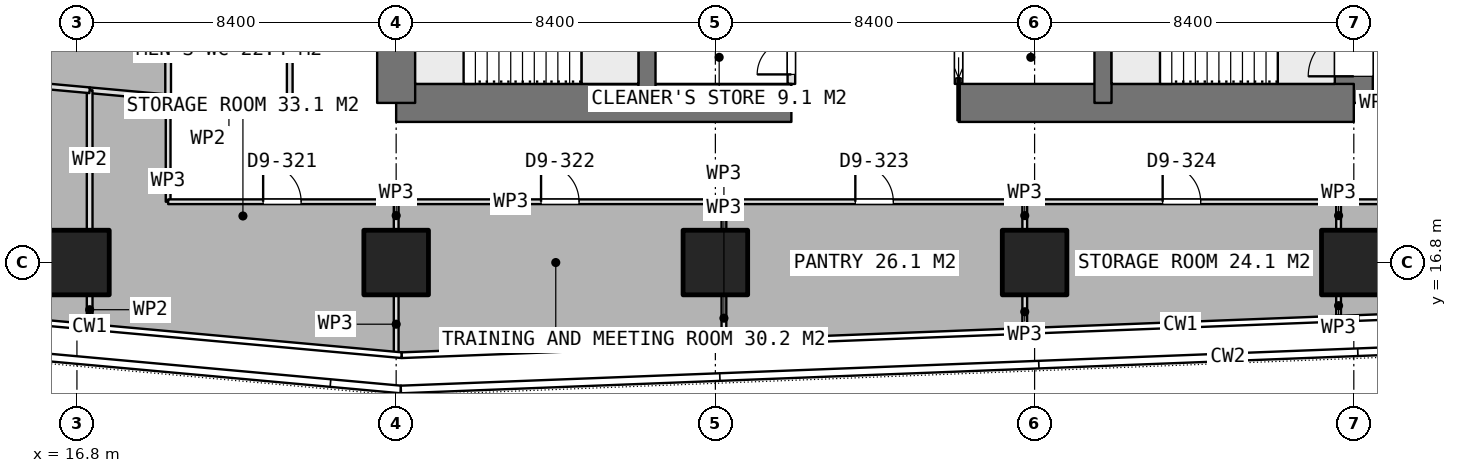
"""IFC4 building model, lengths in metres.
Left out: names, types, materials, properties, quantities, classifications, styles, units other than length and angle.
Written with IfcOpenShell. Run it as: python <this file> out.ifc"""

import sys

from ifc_helpers import new_model, si_unit, direction, frame, frame_2d, origin, origin_2d, place, context, subcontext, project, spatial, rectangle, extrude, element, fill, save


model = new_model("IFC4")
c1 = context("Model", 3, precision=1e-05, world=origin(), true_north=direction((0.0, 1.0)))
c2 = subcontext(c1, "Body", "Model", "MODEL_VIEW")
j1 = project(units=[si_unit("LENGTHUNIT", "METRE"), si_unit("PLANEANGLEUNIT", "RADIAN")], contexts=[c1])
p1 = place(None, origin())
s1 = spatial("IfcSite", under=j1, at=p1, CompositionType="ELEMENT")
p2 = place(p1, origin())
s2 = spatial("IfcBuilding", under=s1, at=p2, CompositionType="ELEMENT")
p3 = place(p2, frame((0.0, 0.0, 99.05)))
s3 = spatial("IfcBuildingStorey", under=s2, at=p3, CompositionType="ELEMENT", Elevation=99.05)
p4 = place(p3, frame((25.2, 21.0, 0.0), z_axis=(0.0, 0.0, 1.0), x_axis=(1.0, 0.0, 0.0)))
e1 = element("IfcWall", 1, at=p4, inside=s3, PredefinedType="SHEAR", context=c2, shape_type="SweptSolid", body=[
    extrude(rectangle(XDim=10.4, YDim=1.0, at=frame_2d((5.2, 0.0))), origin(), (0.0, 0.0, 1.0), 3.75),
])
p5 = place(p3, frame((40.0, 21.0, 0.0), z_axis=(0.0, 0.0, 1.0), x_axis=(1.0, 0.0, 0.0)))
e2 = element("IfcWall", 2, at=p5, inside=s3, PredefinedType="SHEAR", context=c2, shape_type="SweptSolid", body=[
    extrude(rectangle(XDim=10.4, YDim=1.0, at=frame_2d((5.2, 0.0))), origin(), (0.0, 0.0, 1.0), 3.75),
])
p6 = place(p3, frame((25.2, 21.0, 0.0), z_axis=(0.0, 0.0, 1.0), x_axis=(0.0, 1.0, 0.0)))
e3 = element("IfcWall", 3, at=p6, inside=s3, PredefinedType="SHEAR", context=c2, shape_type="SweptSolid", body=[
    extrude(rectangle(XDim=25.2, YDim=1.0, at=frame_2d((12.6, 0.0))), origin(), (0.0, 0.0, 1.0), 3.75),
])
p7 = place(p6, frame((7.8, 0.0, 0.0)))
e4 = element("IfcOpeningElement", 4, at=p7, cuts=e3, PredefinedType="OPENING", context=c2, shape_type="SweptSolid", body=[
    extrude(rectangle(XDim=1.2, YDim=2.1, at=frame_2d((0.6, 1.05))), frame((0.0, 0.51, 0.0), z_axis=(0.0, -1.0, 0.0), x_axis=(1.0, 0.0, 0.0)), (0.0, 0.0, 1.0), 1.02),
])
p8 = place(p6, frame((14.25, 0.0, 0.0)))
e5 = element("IfcOpeningElement", 5, at=p8, cuts=e3, PredefinedType="OPENING", context=c2, shape_type="SweptSolid", body=[
    extrude(rectangle(XDim=0.9, YDim=2.1, at=frame_2d((0.45, 1.05))), frame((0.0, 0.51, 0.0), z_axis=(0.0, -1.0, 0.0), x_axis=(1.0, 0.0, 0.0)), (0.0, 0.0, 1.0), 1.02),
])
p9 = place(p6, frame((16.85, 0.0, 0.0)))
e6 = element("IfcOpeningElement", 6, at=p9, cuts=e3, PredefinedType="OPENING", context=c2, shape_type="SweptSolid", body=[
    extrude(rectangle(XDim=0.9, YDim=2.1, at=frame_2d((0.45, 1.05))), frame((0.0, 0.51, 0.0), z_axis=(0.0, -1.0, 0.0), x_axis=(1.0, 0.0, 0.0)), (0.0, 0.0, 1.0), 1.02),
])
p10 = place(p6, frame((19.025, 0.0, 0.0)))
e7 = element("IfcOpeningElement", 7, at=p10, cuts=e3, PredefinedType="OPENING", context=c2, shape_type="SweptSolid", body=[
    extrude(rectangle(XDim=1.2, YDim=2.1, at=frame_2d((0.6, 1.05))), frame((0.0, 0.51, 0.0), z_axis=(0.0, -1.0, 0.0), x_axis=(1.0, 0.0, 0.0)), (0.0, 0.0, 1.0), 1.02),
])
p11 = place(p3, frame((50.4, 21.0, 0.0), z_axis=(0.0, 0.0, 1.0), x_axis=(0.0, 1.0, 0.0)))
e8 = element("IfcWall", 8, at=p11, inside=s3, PredefinedType="SHEAR", context=c2, shape_type="SweptSolid", body=[
    extrude(rectangle(XDim=25.2, YDim=1.0, at=frame_2d((12.6, 0.0))), origin(), (0.0, 0.0, 1.0), 3.75),
])
p12 = place(p11, frame((16.2, 0.0, 0.0)))
e9 = element("IfcOpeningElement", 9, at=p12, cuts=e8, PredefinedType="OPENING", context=c2, shape_type="SweptSolid", body=[
    extrude(rectangle(XDim=1.2, YDim=2.1, at=frame_2d((0.6, 1.05))), frame((0.0, 0.51, 0.0), z_axis=(0.0, -1.0, 0.0), x_axis=(1.0, 0.0, 0.0)), (0.0, 0.0, 1.0), 1.02),
])
p13 = place(p11, frame((10.05, 0.0, 0.0)))
e10 = element("IfcOpeningElement", 10, at=p13, cuts=e8, PredefinedType="OPENING", context=c2, shape_type="SweptSolid", body=[
    extrude(rectangle(XDim=0.9, YDim=2.1, at=frame_2d((0.45, 1.05))), frame((0.0, 0.51, 0.0), z_axis=(0.0, -1.0, 0.0), x_axis=(1.0, 0.0, 0.0)), (0.0, 0.0, 1.0), 1.02),
])
p14 = place(p11, frame((7.45, 0.0, 0.0)))
e11 = element("IfcOpeningElement", 11, at=p14, cuts=e8, PredefinedType="OPENING", context=c2, shape_type="SweptSolid", body=[
    extrude(rectangle(XDim=0.9, YDim=2.1, at=frame_2d((0.45, 1.05))), frame((0.0, 0.51, 0.0), z_axis=(0.0, -1.0, 0.0), x_axis=(1.0, 0.0, 0.0)), (0.0, 0.0, 1.0), 1.02),
])
p15 = place(p11, frame((0.7, 0.0, 0.0)))
e12 = element("IfcOpeningElement", 12, at=p15, cuts=e8, PredefinedType="OPENING", context=c2, shape_type="SweptSolid", body=[
    extrude(rectangle(XDim=1.2, YDim=2.1, at=frame_2d((0.6, 1.05))), frame((0.0, 0.51, 0.0), z_axis=(0.0, -1.0, 0.0), x_axis=(1.0, 0.0, 0.0)), (0.0, 0.0, 1.0), 1.02),
])
for number, where, z_axis, x_axis in (
    (13, (31.8, 21.0, 0.0), (0.0, 0.0, 1.0), (0.0, 1.0, 0.0)),
    (14, (43.8, 21.0, 0.0), (0.0, 0.0, 1.0), (0.0, 1.0, 0.0)),
):
    element("IfcWall", number, at=place(p3, frame(where, z_axis=z_axis, x_axis=x_axis)), inside=s3, PredefinedType="SHEAR", context=c2, shape_type="SweptSolid", body=[
        extrude(rectangle(XDim=25.2, YDim=0.45, at=frame_2d((12.6, 0.0))), origin(), (0.0, 0.0, 1.0), 3.75),
    ])
for number, where, z_axis, x_axis in (
    (15, (16.8, 16.8, 0.0), (0.0, 0.0, 1.0), (1.0, 0.0, 0.0)),
    (16, (25.2, 16.8, 0.0), (0.0, 0.0, 1.0), (1.0, 0.0, 0.0)),
    (17, (33.6, 16.8, 0.0), (0.0, 0.0, 1.0), (1.0, 0.0, 0.0)),
    (18, (42.0, 16.8, 0.0), (0.0, 0.0, 1.0), (1.0, 0.0, 0.0)),
    (19, (50.4, 16.8, 0.0), (0.0, 0.0, 1.0), (1.0, 0.0, 0.0)),
):
    element("IfcColumn", number, at=place(p3, frame(where, z_axis=z_axis, x_axis=x_axis)), inside=s3, PredefinedType="COLUMN", context=c2, shape_type="SweptSolid", body=[
        extrude(rectangle(XDim=1.7, YDim=1.7, at=origin_2d()), origin(), (0.0, 0.0, 1.0), 3.75),
    ])
p16 = place(p3, frame((40.0, 21.5, 0.0), z_axis=(0.0, 0.0, 1.0), x_axis=(0.0, 1.0, 0.0)))
e20 = element("IfcWall", 20, at=p16, inside=s3, PredefinedType="PARTITIONING", context=c2, shape_type="SweptSolid", body=[
    extrude(rectangle(XDim=1.675, YDim=0.2, at=frame_2d((0.837, 0.0))), origin(), (0.0, 0.0, 1.0), 3.5),
])
p17 = place(p16, frame((0.15, 0.0, 0.0)))
e21 = element("IfcOpeningElement", 21, at=p17, cuts=e20, PredefinedType="OPENING", context=c2, shape_type="SweptSolid", body=[
    extrude(rectangle(XDim=1.1, YDim=2.1, at=frame_2d((0.55, 1.05))), frame((0.0, 0.11, 0.0), z_axis=(0.0, -1.0, 0.0), x_axis=(1.0, 0.0, 0.0)), (0.0, 0.0, 1.0), 0.22),
])
p18 = place(p3, frame((35.6, 21.5, 0.0), z_axis=(0.0, 0.0, 1.0), x_axis=(0.0, 1.0, 0.0)))
e22 = element("IfcWall", 22, at=p18, inside=s3, PredefinedType="PARTITIONING", context=c2, shape_type="SweptSolid", body=[
    extrude(rectangle(XDim=1.675, YDim=0.2, at=frame_2d((0.837, 0.0))), origin(), (0.0, 0.0, 1.0), 3.5),
])
p19 = place(p18, frame((0.25, 0.0, 0.0)))
e23 = element("IfcOpeningElement", 23, at=p19, cuts=e22, PredefinedType="OPENING", context=c2, shape_type="SweptSolid", body=[
    extrude(rectangle(XDim=0.9, YDim=2.1, at=frame_2d((0.45, 1.05))), frame((0.0, 0.11, 0.0), z_axis=(0.0, -1.0, 0.0), x_axis=(1.0, 0.0, 0.0)), (0.0, 0.0, 1.0), 0.22),
])
p20 = place(p3, frame((19.125, 21.0, 0.0), z_axis=(0.0, 0.0, 1.0), x_axis=(1.0, 0.0, 0.0)))
e24 = element("IfcWall", 24, at=p20, inside=s3, PredefinedType="PARTITIONING", context=c2, shape_type="SweptSolid", body=[
    extrude(rectangle(XDim=3.35, YDim=0.15, at=frame_2d((1.675, 0.0))), origin(), (0.0, 0.0, 1.0), 3.5),
])
p21 = place(p3, frame((19.2, 21.075, 0.0), z_axis=(0.0, 0.0, 1.0), x_axis=(0.0, 1.0, 0.0)))
e25 = element("IfcWall", 25, at=p21, inside=s3, PredefinedType="PARTITIONING", context=c2, shape_type="SweptSolid", body=[
    extrude(rectangle(XDim=6.85, YDim=0.15, at=frame_2d((3.425, 0.0))), origin(), (0.0, 0.0, 1.0), 3.5),
])
p22 = place(p3, frame((22.4, 21.075, 0.0), z_axis=(0.0, 0.0, 1.0), x_axis=(0.0, 1.0, 0.0)))
e26 = element("IfcWall", 26, at=p22, inside=s3, PredefinedType="PARTITIONING", context=c2, shape_type="SweptSolid", body=[
    extrude(rectangle(XDim=6.85, YDim=0.15, at=frame_2d((3.425, 0.0))), origin(), (0.0, 0.0, 1.0), 3.5),
])
p23 = place(p22, frame((2.925, 0.0, 0.0)))
e27 = element("IfcOpeningElement", 27, at=p23, cuts=e26, PredefinedType="OPENING", context=c2, shape_type="SweptSolid", body=[
    extrude(rectangle(XDim=1.0, YDim=2.1, at=frame_2d((0.5, 1.05))), frame((0.0, 0.085, 0.0), z_axis=(0.0, -1.0, 0.0), x_axis=(1.0, 0.0, 0.0)), (0.0, 0.0, 1.0), 0.17),
])
p24 = place(p3, frame((19.125, 21.153, 0.0), z_axis=(0.0, 0.0, 1.0), x_axis=(-0.995937155539, 0.090050997869, 0.0)))
e28 = element("IfcWall", 28, at=p24, inside=s3, PredefinedType="PARTITIONING", context=c2, shape_type="SweptSolid", body=[
    extrude(rectangle(XDim=1.998, YDim=0.15, at=frame_2d((0.999, 0.0))), origin(), (0.0, 0.0, 1.0), 3.5),
])
p25 = place(p3, frame((17.135, 21.333, 0.0), z_axis=(0.0, 0.0, 1.0), x_axis=(0.0, -1.0, 0.0)))
e29 = element("IfcWall", 29, at=p25, inside=s3, PredefinedType="PARTITIONING", context=c2, shape_type="SweptSolid", body=[
    extrude(rectangle(XDim=3.663, YDim=0.15, at=frame_2d((1.832, 0.0))), origin(), (0.0, 0.0, 1.0), 3.5),
])
p26 = place(p3, frame((17.135, 15.93, 0.0), z_axis=(0.0, 0.0, 1.0), x_axis=(0.0, -1.0, 0.0)))
e30 = element("IfcWall", 30, at=p26, inside=s3, PredefinedType="PARTITIONING", context=c2, shape_type="SweptSolid", body=[
    extrude(rectangle(XDim=0.742, YDim=0.15, at=frame_2d((0.371, 0.0))), origin(), (0.0, 0.0, 1.0), 3.5),
])
p27 = place(p3, frame((17.134, 21.333, 0.0), z_axis=(0.0, 0.0, 1.0), x_axis=(-0.995896088747, 0.090504035375, 0.0)))
e31 = element("IfcWall", 31, at=p27, inside=s3, PredefinedType="PARTITIONING", context=c2, shape_type="SweptSolid", body=[
    extrude(rectangle(XDim=4.165, YDim=0.15, at=frame_2d((2.083, 0.0))), origin(), (0.0, 0.0, 1.0), 3.5),
])
p28 = place(p3, frame((41.741, 15.08, 0.0), z_axis=(0.0, 0.0, 1.0), x_axis=(0.0, 1.0, 0.0)))
e32 = element("IfcWall", 32, at=p28, inside=s3, PredefinedType="PARTITIONING", context=c2, shape_type="SweptSolid", body=[
    extrude(rectangle(XDim=0.85, YDim=0.125, at=frame_2d((0.425, 0.0))), origin(), (0.0, 0.0, 1.0), 3.5),
])
p29 = place(p3, frame((41.741, 17.67, 0.0), z_axis=(0.0, 0.0, 1.0), x_axis=(0.0, 1.0, 0.0)))
e33 = element("IfcWall", 33, at=p29, inside=s3, PredefinedType="PARTITIONING", context=c2, shape_type="SweptSolid", body=[
    extrude(rectangle(XDim=0.73, YDim=0.125, at=frame_2d((0.365, 0.0))), origin(), (0.0, 0.0, 1.0), 3.5),
])
p30 = place(p3, frame((41.741, 18.4, 0.0), z_axis=(0.0, 0.0, 1.0), x_axis=(1.0, 0.0, 0.0)))
e34 = element("IfcWall", 34, at=p30, inside=s3, PredefinedType="PARTITIONING", context=c2, shape_type="SweptSolid", body=[
    extrude(rectangle(XDim=8.258, YDim=0.125, at=frame_2d((4.129, 0.0))), origin(), (0.0, 0.0, 1.0), 3.5),
])
p31 = place(p30, frame((3.629, 0.0, 0.0)))
e35 = element("IfcOpeningElement", 35, at=p31, cuts=e34, PredefinedType="OPENING", context=c2, shape_type="SweptSolid", body=[
    extrude(rectangle(XDim=1.0, YDim=2.1, at=frame_2d((0.5, 1.05))), frame((0.0, 0.073, 0.0), z_axis=(0.0, -1.0, 0.0), x_axis=(1.0, 0.0, 0.0)), (0.0, 0.0, 1.0), 0.145),
])
p32 = place(p3, frame((49.999, 18.4, 0.0), z_axis=(0.0, 0.0, 1.0), x_axis=(0.0, -1.0, 0.0)))
e36 = element("IfcWall", 36, at=p32, inside=s3, PredefinedType="PARTITIONING", context=c2, shape_type="SweptSolid", body=[
    extrude(rectangle(XDim=0.73, YDim=0.125, at=frame_2d((0.365, 0.0))), origin(), (0.0, 0.0, 1.0), 3.5),
])
p33 = place(p3, frame((49.999, 15.93, 0.0), z_axis=(0.0, 0.0, 1.0), x_axis=(0.0, -1.0, 0.0)))
e37 = element("IfcWall", 37, at=p33, inside=s3, PredefinedType="PARTITIONING", context=c2, shape_type="SweptSolid", body=[
    extrude(rectangle(XDim=0.529, YDim=0.125, at=frame_2d((0.265, 0.0))), origin(), (0.0, 0.0, 1.0), 3.5),
])
p34 = place(p3, frame((50.0, 18.4, 0.0), z_axis=(0.0, 0.0, 1.0), x_axis=(1.0, 0.0, 0.0)))
e38 = element("IfcWall", 38, at=p34, inside=s3, PredefinedType="PARTITIONING", context=c2, shape_type="SweptSolid", body=[
    extrude(rectangle(XDim=6.4, YDim=0.125, at=frame_2d((3.2, 0.0))), origin(), (0.0, 0.0, 1.0), 3.5),
])
p35 = place(p34, frame((2.7, 0.0, 0.0)))
e39 = element("IfcOpeningElement", 39, at=p35, cuts=e38, PredefinedType="OPENING", context=c2, shape_type="SweptSolid", body=[
    extrude(rectangle(XDim=1.0, YDim=2.1, at=frame_2d((0.5, 1.05))), frame((0.0, 0.073, 0.0), z_axis=(0.0, -1.0, 0.0), x_axis=(1.0, 0.0, 0.0)), (0.0, 0.0, 1.0), 0.145),
])
p36 = place(p3, frame((25.201, 18.4, 0.0), z_axis=(0.0, 0.0, 1.0), x_axis=(0.0, -1.0, 0.0)))
e40 = element("IfcWall", 40, at=p36, inside=s3, PredefinedType="PARTITIONING", context=c2, shape_type="SweptSolid", body=[
    extrude(rectangle(XDim=0.73, YDim=0.125, at=frame_2d((0.365, 0.0))), origin(), (0.0, 0.0, 1.0), 3.5),
])
p37 = place(p3, frame((25.201, 15.93, 0.0), z_axis=(0.0, 0.0, 1.0), x_axis=(0.0, -1.0, 0.0)))
e41 = element("IfcWall", 41, at=p37, inside=s3, PredefinedType="PARTITIONING", context=c2, shape_type="SweptSolid", body=[
    extrude(rectangle(XDim=1.505, YDim=0.125, at=frame_2d((0.752, 0.0))), origin(), (0.0, 0.0, 1.0), 3.5),
])
p38 = place(p3, frame((19.2, 21.074, 0.0), z_axis=(0.0, 0.0, 1.0), x_axis=(0.0, -1.0, 0.0)))
e42 = element("IfcWall", 42, at=p38, inside=s3, PredefinedType="PARTITIONING", context=c2, shape_type="SweptSolid", body=[
    extrude(rectangle(XDim=2.674, YDim=0.125, at=frame_2d((1.337, 0.0))), origin(), (0.0, 0.0, 1.0), 3.5),
])
p39 = place(p3, frame((19.2, 18.4, 0.0), z_axis=(0.0, 0.0, 1.0), x_axis=(1.0, 0.0, 0.0)))
e43 = element("IfcWall", 43, at=p39, inside=s3, PredefinedType="PARTITIONING", context=c2, shape_type="SweptSolid", body=[
    extrude(rectangle(XDim=6.001, YDim=0.125, at=frame_2d((3.0, 0.0))), origin(), (0.0, 0.0, 1.0), 3.5),
])
p40 = place(p39, frame((2.5, 0.0, 0.0)))
e44 = element("IfcOpeningElement", 44, at=p40, cuts=e43, PredefinedType="OPENING", context=c2, shape_type="SweptSolid", body=[
    extrude(rectangle(XDim=1.0, YDim=2.1, at=frame_2d((0.5, 1.05))), frame((0.0, 0.073, 0.0), z_axis=(0.0, -1.0, 0.0), x_axis=(1.0, 0.0, 0.0)), (0.0, 0.0, 1.0), 0.145),
])
p41 = place(p3, frame((25.202, 18.4, 0.0), z_axis=(0.0, 0.0, 1.0), x_axis=(1.0, 0.0, 0.0)))
e45 = element("IfcWall", 45, at=p41, inside=s3, PredefinedType="PARTITIONING", context=c2, shape_type="SweptSolid", body=[
    extrude(rectangle(XDim=8.623, YDim=0.125, at=frame_2d((4.312, 0.0))), origin(), (0.0, 0.0, 1.0), 3.5),
])
p42 = place(p41, frame((3.811, 0.0, 0.0)))
e46 = element("IfcOpeningElement", 46, at=p42, cuts=e45, PredefinedType="OPENING", context=c2, shape_type="SweptSolid", body=[
    extrude(rectangle(XDim=1.0, YDim=2.1, at=frame_2d((0.5, 1.05))), frame((0.0, 0.073, 0.0), z_axis=(0.0, -1.0, 0.0), x_axis=(1.0, 0.0, 0.0)), (0.0, 0.0, 1.0), 0.145),
])
p43 = place(p3, frame((33.825, 18.4, 0.0), z_axis=(0.0, 0.0, 1.0), x_axis=(0.0, -1.0, 0.0)))
e47 = element("IfcWall", 47, at=p43, inside=s3, PredefinedType="PARTITIONING", context=c2, shape_type="SweptSolid", body=[
    extrude(rectangle(XDim=0.73, YDim=0.125, at=frame_2d((0.365, 0.0))), origin(), (0.0, 0.0, 1.0), 3.5),
])
p44 = place(p3, frame((33.825, 15.93, 0.0), z_axis=(0.0, 0.0, 1.0), x_axis=(0.0, -1.0, 0.0)))
e48 = element("IfcWall", 48, at=p44, inside=s3, PredefinedType="PARTITIONING", context=c2, shape_type="SweptSolid", body=[
    extrude(rectangle(XDim=1.188, YDim=0.125, at=frame_2d((0.594, 0.0))), origin(), (0.0, 0.0, 1.0), 3.5),
])
p45 = place(p3, frame((33.826, 18.4, 0.0), z_axis=(0.0, 0.0, 1.0), x_axis=(1.0, 0.0, 0.0)))
e49 = element("IfcWall", 49, at=p45, inside=s3, PredefinedType="PARTITIONING", context=c2, shape_type="SweptSolid", body=[
    extrude(rectangle(XDim=7.914, YDim=0.125, at=frame_2d((3.957, 0.0))), origin(), (0.0, 0.0, 1.0), 3.5),
])
p46 = place(p45, frame((3.457, 0.0, 0.0)))
e50 = element("IfcOpeningElement", 50, at=p46, cuts=e49, PredefinedType="OPENING", context=c2, shape_type="SweptSolid", body=[
    extrude(rectangle(XDim=1.0, YDim=2.1, at=frame_2d((0.5, 1.05))), frame((0.0, 0.073, 0.0), z_axis=(0.0, -1.0, 0.0), x_axis=(1.0, 0.0, 0.0)), (0.0, 0.0, 1.0), 0.145),
])
p47 = place(p17, origin())
e51 = element("IfcDoor", 51, at=p47, inside=s3, OperationType="SLIDING_TO_LEFT", PredefinedType="DOOR", context=c2, shape_type="SweptSolid", body=[
    extrude(rectangle(XDim=1.1, YDim=2.1, at=frame_2d((0.55, 1.05))), frame((0.0, 0.025, 0.0), z_axis=(0.0, -1.0, 0.0), x_axis=(1.0, 0.0, 0.0)), (0.0, 0.0, 1.0), 0.05),
])
fill(e21, e51)
p48 = place(p19, origin())
e52 = element("IfcDoor", 52, at=p48, inside=s3, OperationType="SINGLE_SWING_LEFT", PredefinedType="DOOR", context=c2, shape_type="SweptSolid", body=[
    extrude(rectangle(XDim=0.9, YDim=2.1, at=frame_2d((0.45, 1.05))), frame((0.0, 0.025, 0.0), z_axis=(0.0, -1.0, 0.0), x_axis=(1.0, 0.0, 0.0)), (0.0, 0.0, 1.0), 0.05),
])
fill(e23, e52)
p49 = place(p31, origin())
e53 = element("IfcDoor", 53, at=p49, inside=s3, OperationType="SINGLE_SWING_LEFT", PredefinedType="DOOR", context=c2, shape_type="SweptSolid", body=[
    extrude(rectangle(XDim=1.0, YDim=2.1, at=frame_2d((0.5, 1.05))), frame((0.0, 0.025, 0.0), z_axis=(0.0, -1.0, 0.0), x_axis=(1.0, 0.0, 0.0)), (0.0, 0.0, 1.0), 0.05),
])
fill(e35, e53)
p50 = place(p40, origin())
e54 = element("IfcDoor", 54, at=p50, inside=s3, OperationType="SINGLE_SWING_LEFT", PredefinedType="DOOR", context=c2, shape_type="SweptSolid", body=[
    extrude(rectangle(XDim=1.0, YDim=2.1, at=frame_2d((0.5, 1.05))), frame((0.0, 0.025, 0.0), z_axis=(0.0, -1.0, 0.0), x_axis=(1.0, 0.0, 0.0)), (0.0, 0.0, 1.0), 0.05),
])
fill(e44, e54)
p51 = place(p42, origin())
e55 = element("IfcDoor", 55, at=p51, inside=s3, OperationType="SINGLE_SWING_LEFT", PredefinedType="DOOR", context=c2, shape_type="SweptSolid", body=[
    extrude(rectangle(XDim=1.0, YDim=2.1, at=frame_2d((0.5, 1.05))), frame((0.0, 0.025, 0.0), z_axis=(0.0, -1.0, 0.0), x_axis=(1.0, 0.0, 0.0)), (0.0, 0.0, 1.0), 0.05),
])
fill(e46, e55)
p52 = place(p46, origin())
e56 = element("IfcDoor", 56, at=p52, inside=s3, OperationType="SINGLE_SWING_LEFT", PredefinedType="DOOR", context=c2, shape_type="SweptSolid", body=[
    extrude(rectangle(XDim=1.0, YDim=2.1, at=frame_2d((0.5, 1.05))), frame((0.0, 0.025, 0.0), z_axis=(0.0, -1.0, 0.0), x_axis=(1.0, 0.0, 0.0)), (0.0, 0.0, 1.0), 0.05),
])
fill(e50, e56)
p53 = place(p15, origin())
e57 = element("IfcDoor", 57, at=p53, inside=s3, OperationType="SINGLE_SWING_RIGHT", PredefinedType="DOOR", context=c2, shape_type="SweptSolid", body=[
    extrude(rectangle(XDim=1.2, YDim=2.1, at=frame_2d((0.6, 1.05))), frame((0.0, 0.025, 0.0), z_axis=(0.0, -1.0, 0.0), x_axis=(1.0, 0.0, 0.0)), (0.0, 0.0, 1.0), 0.05),
])
fill(e12, e57)
save(model, sys.argv[1])
